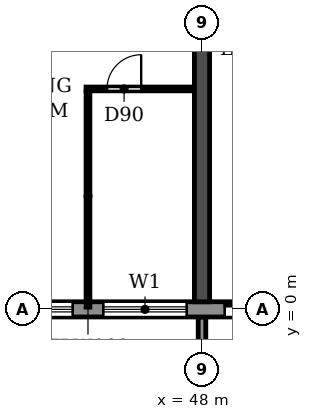
"""IFC4 building model, lengths in metres.
Left out: names, types, materials, properties, quantities, classifications, styles, units other than length and angle.
Written with IfcOpenShell. Run it as: python <this file> out.ifc"""

import sys

from ifc_helpers import new_model, si_unit, direction, frame, frame_2d, origin, place, context, subcontext, project, spatial, polyline, rectangle, outline, extrude, source, transform, mapped, element, fill, save


model = new_model("IFC4")
c1 = context("Model", 3, precision=1e-05, world=origin(), true_north=direction((0.0, 1.0)))
c2 = subcontext(c1, "Body", "Model", "MODEL_VIEW")
j1 = project(units=[si_unit("LENGTHUNIT", "METRE"), si_unit("PLANEANGLEUNIT", "RADIAN")], contexts=[c1])
p1 = place(None, origin())
s1 = spatial("IfcSite", under=j1, at=p1, CompositionType="ELEMENT")
p2 = place(p1, origin())
s2 = spatial("IfcBuilding", under=s1, at=p2, CompositionType="ELEMENT")
p3 = place(p2, frame((0.0, 0.0, 26.7)))
s3 = spatial("IfcBuildingStorey", under=s2, at=p3, CompositionType="ELEMENT", Elevation=26.7)
p4 = place(p3, frame((48.0, 0.2, 0.0), z_axis=(0.0, 0.0, 1.0), x_axis=(0.0, 1.0, 0.0)))
e1 = element("IfcWall", 1, at=p4, inside=s3, PredefinedType="SHEAR", context=c2, shape_type="SweptSolid", body=[
    extrude(rectangle(XDim=11.65, YDim=0.4, at=frame_2d((5.825, 0.0))), origin(), (0.0, 0.0, 1.0), 3.05),
])
p5 = place(p3, frame((4.683, 0.0, 0.0), z_axis=(0.0, 0.0, 1.0), x_axis=(1.0, 0.0, 0.0)))
e2 = element("IfcWall", 2, at=p5, inside=s3, PredefinedType="STANDARD", context=c2, shape_type="SweptSolid", body=[
    extrude(rectangle(XDim=92.634, YDim=0.4, at=frame_2d((46.317, 0.0))), origin(), (0.0, 0.0, 1.0), 3.05),
])
p6 = place(p5, frame((1.717, 0.0, 0.9)))
e3 = element("IfcOpeningElement", 3, at=p6, cuts=e2, PredefinedType="OPENING", context=c2, shape_type="SweptSolid", body=[
    extrude(rectangle(XDim=2.2, YDim=1.5, at=frame_2d((1.1, 0.75))), frame((0.0, 0.21, 0.0), z_axis=(0.0, -1.0, 0.0), x_axis=(1.0, 0.0, 0.0)), (0.0, 0.0, 1.0), 0.42),
])
p7 = place(p5, frame((4.717, 0.0, 0.9)))
e4 = element("IfcOpeningElement", 4, at=p7, cuts=e2, PredefinedType="OPENING", context=c2, shape_type="SweptSolid", body=[
    extrude(rectangle(XDim=2.2, YDim=1.5, at=frame_2d((1.1, 0.75))), frame((0.0, 0.21, 0.0), z_axis=(0.0, -1.0, 0.0), x_axis=(1.0, 0.0, 0.0)), (0.0, 0.0, 1.0), 0.42),
])
p8 = place(p5, frame((7.717, 0.0, 0.9)))
e5 = element("IfcOpeningElement", 5, at=p8, cuts=e2, PredefinedType="OPENING", context=c2, shape_type="SweptSolid", body=[
    extrude(rectangle(XDim=2.2, YDim=1.5, at=frame_2d((1.1, 0.75))), frame((0.0, 0.21, 0.0), z_axis=(0.0, -1.0, 0.0), x_axis=(1.0, 0.0, 0.0)), (0.0, 0.0, 1.0), 0.42),
])
p9 = place(p5, frame((10.717, 0.0, 0.9)))
e6 = element("IfcOpeningElement", 6, at=p9, cuts=e2, PredefinedType="OPENING", context=c2, shape_type="SweptSolid", body=[
    extrude(rectangle(XDim=2.2, YDim=1.5, at=frame_2d((1.1, 0.75))), frame((0.0, 0.21, 0.0), z_axis=(0.0, -1.0, 0.0), x_axis=(1.0, 0.0, 0.0)), (0.0, 0.0, 1.0), 0.42),
])
p10 = place(p5, frame((13.717, 0.0, 0.9)))
e7 = element("IfcOpeningElement", 7, at=p10, cuts=e2, PredefinedType="OPENING", context=c2, shape_type="SweptSolid", body=[
    extrude(rectangle(XDim=2.2, YDim=1.5, at=frame_2d((1.1, 0.75))), frame((0.0, 0.21, 0.0), z_axis=(0.0, -1.0, 0.0), x_axis=(1.0, 0.0, 0.0)), (0.0, 0.0, 1.0), 0.42),
])
p11 = place(p5, frame((16.717, 0.0, 0.9)))
e8 = element("IfcOpeningElement", 8, at=p11, cuts=e2, PredefinedType="OPENING", context=c2, shape_type="SweptSolid", body=[
    extrude(rectangle(XDim=2.2, YDim=1.5, at=frame_2d((1.1, 0.75))), frame((0.0, 0.21, 0.0), z_axis=(0.0, -1.0, 0.0), x_axis=(1.0, 0.0, 0.0)), (0.0, 0.0, 1.0), 0.42),
])
p12 = place(p5, frame((19.917, 0.0, 0.0)))
e9 = element("IfcOpeningElement", 9, at=p12, cuts=e2, PredefinedType="OPENING", context=c2, shape_type="SweptSolid", body=[
    extrude(rectangle(XDim=1.8, YDim=2.4, at=frame_2d((0.9, 1.2))), frame((0.0, 0.21, 0.0), z_axis=(0.0, -1.0, 0.0), x_axis=(1.0, 0.0, 0.0)), (0.0, 0.0, 1.0), 0.42),
])
p13 = place(p5, frame((22.717, 0.0, 0.9)))
e10 = element("IfcOpeningElement", 10, at=p13, cuts=e2, PredefinedType="OPENING", context=c2, shape_type="SweptSolid", body=[
    extrude(rectangle(XDim=2.2, YDim=1.5, at=frame_2d((1.1, 0.75))), frame((0.0, 0.21, 0.0), z_axis=(0.0, -1.0, 0.0), x_axis=(1.0, 0.0, 0.0)), (0.0, 0.0, 1.0), 0.42),
])
p14 = place(p5, frame((25.717, 0.0, 0.9)))
e11 = element("IfcOpeningElement", 11, at=p14, cuts=e2, PredefinedType="OPENING", context=c2, shape_type="SweptSolid", body=[
    extrude(rectangle(XDim=2.2, YDim=1.5, at=frame_2d((1.1, 0.75))), frame((0.0, 0.21, 0.0), z_axis=(0.0, -1.0, 0.0), x_axis=(1.0, 0.0, 0.0)), (0.0, 0.0, 1.0), 0.42),
])
p15 = place(p5, frame((28.717, 0.0, 0.9)))
e12 = element("IfcOpeningElement", 12, at=p15, cuts=e2, PredefinedType="OPENING", context=c2, shape_type="SweptSolid", body=[
    extrude(rectangle(XDim=2.2, YDim=1.5, at=frame_2d((1.1, 0.75))), frame((0.0, 0.21, 0.0), z_axis=(0.0, -1.0, 0.0), x_axis=(1.0, 0.0, 0.0)), (0.0, 0.0, 1.0), 0.42),
])
p16 = place(p5, frame((31.917, 0.0, 0.0)))
e13 = element("IfcOpeningElement", 13, at=p16, cuts=e2, PredefinedType="OPENING", context=c2, shape_type="SweptSolid", body=[
    extrude(rectangle(XDim=1.8, YDim=2.4, at=frame_2d((0.9, 1.2))), frame((0.0, 0.21, 0.0), z_axis=(0.0, -1.0, 0.0), x_axis=(1.0, 0.0, 0.0)), (0.0, 0.0, 1.0), 0.42),
])
p17 = place(p5, frame((34.717, 0.0, 0.9)))
e14 = element("IfcOpeningElement", 14, at=p17, cuts=e2, PredefinedType="OPENING", context=c2, shape_type="SweptSolid", body=[
    extrude(rectangle(XDim=2.2, YDim=1.5, at=frame_2d((1.1, 0.75))), frame((0.0, 0.21, 0.0), z_axis=(0.0, -1.0, 0.0), x_axis=(1.0, 0.0, 0.0)), (0.0, 0.0, 1.0), 0.42),
])
p18 = place(p5, frame((37.717, 0.0, 0.9)))
e15 = element("IfcOpeningElement", 15, at=p18, cuts=e2, PredefinedType="OPENING", context=c2, shape_type="SweptSolid", body=[
    extrude(rectangle(XDim=2.2, YDim=1.5, at=frame_2d((1.1, 0.75))), frame((0.0, 0.21, 0.0), z_axis=(0.0, -1.0, 0.0), x_axis=(1.0, 0.0, 0.0)), (0.0, 0.0, 1.0), 0.42),
])
p19 = place(p5, frame((40.717, 0.0, 0.9)))
e16 = element("IfcOpeningElement", 16, at=p19, cuts=e2, PredefinedType="OPENING", context=c2, shape_type="SweptSolid", body=[
    extrude(rectangle(XDim=2.2, YDim=1.5, at=frame_2d((1.1, 0.75))), frame((0.0, 0.21, 0.0), z_axis=(0.0, -1.0, 0.0), x_axis=(1.0, 0.0, 0.0)), (0.0, 0.0, 1.0), 0.42),
])
p20 = place(p5, frame((43.917, 0.0, 0.0)))
e17 = element("IfcOpeningElement", 17, at=p20, cuts=e2, PredefinedType="OPENING", context=c2, shape_type="SweptSolid", body=[
    extrude(rectangle(XDim=1.8, YDim=2.4, at=frame_2d((0.9, 1.2))), frame((0.0, 0.21, 0.0), z_axis=(0.0, -1.0, 0.0), x_axis=(1.0, 0.0, 0.0)), (0.0, 0.0, 1.0), 0.42),
])
p21 = place(p5, frame((46.717, 0.0, 0.9)))
e18 = element("IfcOpeningElement", 18, at=p21, cuts=e2, PredefinedType="OPENING", context=c2, shape_type="SweptSolid", body=[
    extrude(rectangle(XDim=2.2, YDim=1.5, at=frame_2d((1.1, 0.75))), frame((0.0, 0.21, 0.0), z_axis=(0.0, -1.0, 0.0), x_axis=(1.0, 0.0, 0.0)), (0.0, 0.0, 1.0), 0.42),
])
p22 = place(p5, frame((49.717, 0.0, 0.9)))
e19 = element("IfcOpeningElement", 19, at=p22, cuts=e2, PredefinedType="OPENING", context=c2, shape_type="SweptSolid", body=[
    extrude(rectangle(XDim=2.2, YDim=1.5, at=frame_2d((1.1, 0.75))), frame((0.0, 0.21, 0.0), z_axis=(0.0, -1.0, 0.0), x_axis=(1.0, 0.0, 0.0)), (0.0, 0.0, 1.0), 0.42),
])
p23 = place(p5, frame((52.717, 0.0, 0.9)))
e20 = element("IfcOpeningElement", 20, at=p23, cuts=e2, PredefinedType="OPENING", context=c2, shape_type="SweptSolid", body=[
    extrude(rectangle(XDim=2.2, YDim=1.5, at=frame_2d((1.1, 0.75))), frame((0.0, 0.21, 0.0), z_axis=(0.0, -1.0, 0.0), x_axis=(1.0, 0.0, 0.0)), (0.0, 0.0, 1.0), 0.42),
])
p24 = place(p5, frame((55.717, 0.0, 0.9)))
e21 = element("IfcOpeningElement", 21, at=p24, cuts=e2, PredefinedType="OPENING", context=c2, shape_type="SweptSolid", body=[
    extrude(rectangle(XDim=2.2, YDim=1.5, at=frame_2d((1.1, 0.75))), frame((0.0, 0.21, 0.0), z_axis=(0.0, -1.0, 0.0), x_axis=(1.0, 0.0, 0.0)), (0.0, 0.0, 1.0), 0.42),
])
p25 = place(p5, frame((58.917, 0.0, 0.0)))
e22 = element("IfcOpeningElement", 22, at=p25, cuts=e2, PredefinedType="OPENING", context=c2, shape_type="SweptSolid", body=[
    extrude(rectangle(XDim=1.8, YDim=2.4, at=frame_2d((0.9, 1.2))), frame((0.0, 0.21, 0.0), z_axis=(0.0, -1.0, 0.0), x_axis=(1.0, 0.0, 0.0)), (0.0, 0.0, 1.0), 0.42),
])
p26 = place(p5, frame((61.717, 0.0, 0.9)))
e23 = element("IfcOpeningElement", 23, at=p26, cuts=e2, PredefinedType="OPENING", context=c2, shape_type="SweptSolid", body=[
    extrude(rectangle(XDim=2.2, YDim=1.5, at=frame_2d((1.1, 0.75))), frame((0.0, 0.21, 0.0), z_axis=(0.0, -1.0, 0.0), x_axis=(1.0, 0.0, 0.0)), (0.0, 0.0, 1.0), 0.42),
])
p27 = place(p5, frame((64.717, 0.0, 0.9)))
e24 = element("IfcOpeningElement", 24, at=p27, cuts=e2, PredefinedType="OPENING", context=c2, shape_type="SweptSolid", body=[
    extrude(rectangle(XDim=2.2, YDim=1.5, at=frame_2d((1.1, 0.75))), frame((0.0, 0.21, 0.0), z_axis=(0.0, -1.0, 0.0), x_axis=(1.0, 0.0, 0.0)), (0.0, 0.0, 1.0), 0.42),
])
p28 = place(p5, frame((67.717, 0.0, 0.9)))
e25 = element("IfcOpeningElement", 25, at=p28, cuts=e2, PredefinedType="OPENING", context=c2, shape_type="SweptSolid", body=[
    extrude(rectangle(XDim=2.2, YDim=1.5, at=frame_2d((1.1, 0.75))), frame((0.0, 0.21, 0.0), z_axis=(0.0, -1.0, 0.0), x_axis=(1.0, 0.0, 0.0)), (0.0, 0.0, 1.0), 0.42),
])
p29 = place(p5, frame((70.917, 0.0, 0.0)))
e26 = element("IfcOpeningElement", 26, at=p29, cuts=e2, PredefinedType="OPENING", context=c2, shape_type="SweptSolid", body=[
    extrude(rectangle(XDim=1.8, YDim=2.4, at=frame_2d((0.9, 1.2))), frame((0.0, 0.21, 0.0), z_axis=(0.0, -1.0, 0.0), x_axis=(1.0, 0.0, 0.0)), (0.0, 0.0, 1.0), 0.42),
])
p30 = place(p5, frame((73.717, 0.0, 0.9)))
e27 = element("IfcOpeningElement", 27, at=p30, cuts=e2, PredefinedType="OPENING", context=c2, shape_type="SweptSolid", body=[
    extrude(rectangle(XDim=2.2, YDim=1.5, at=frame_2d((1.1, 0.75))), frame((0.0, 0.21, 0.0), z_axis=(0.0, -1.0, 0.0), x_axis=(1.0, 0.0, 0.0)), (0.0, 0.0, 1.0), 0.42),
])
p31 = place(p5, frame((76.717, 0.0, 0.9)))
e28 = element("IfcOpeningElement", 28, at=p31, cuts=e2, PredefinedType="OPENING", context=c2, shape_type="SweptSolid", body=[
    extrude(rectangle(XDim=2.2, YDim=1.5, at=frame_2d((1.1, 0.75))), frame((0.0, 0.21, 0.0), z_axis=(0.0, -1.0, 0.0), x_axis=(1.0, 0.0, 0.0)), (0.0, 0.0, 1.0), 0.42),
])
p32 = place(p5, frame((79.717, 0.0, 0.9)))
e29 = element("IfcOpeningElement", 29, at=p32, cuts=e2, PredefinedType="OPENING", context=c2, shape_type="SweptSolid", body=[
    extrude(rectangle(XDim=2.2, YDim=1.5, at=frame_2d((1.1, 0.75))), frame((0.0, 0.21, 0.0), z_axis=(0.0, -1.0, 0.0), x_axis=(1.0, 0.0, 0.0)), (0.0, 0.0, 1.0), 0.42),
])
p33 = place(p5, frame((82.717, 0.0, 0.9)))
e30 = element("IfcOpeningElement", 30, at=p33, cuts=e2, PredefinedType="OPENING", context=c2, shape_type="SweptSolid", body=[
    extrude(rectangle(XDim=2.2, YDim=1.5, at=frame_2d((1.1, 0.75))), frame((0.0, 0.21, 0.0), z_axis=(0.0, -1.0, 0.0), x_axis=(1.0, 0.0, 0.0)), (0.0, 0.0, 1.0), 0.42),
])
p34 = place(p5, frame((85.717, 0.0, 0.9)))
e31 = element("IfcOpeningElement", 31, at=p34, cuts=e2, PredefinedType="OPENING", context=c2, shape_type="SweptSolid", body=[
    extrude(rectangle(XDim=2.2, YDim=1.5, at=frame_2d((1.1, 0.75))), frame((0.0, 0.21, 0.0), z_axis=(0.0, -1.0, 0.0), x_axis=(1.0, 0.0, 0.0)), (0.0, 0.0, 1.0), 0.42),
])
p35 = place(p5, frame((88.717, 0.0, 0.9)))
e32 = element("IfcOpeningElement", 32, at=p35, cuts=e2, PredefinedType="OPENING", context=c2, shape_type="SweptSolid", body=[
    extrude(rectangle(XDim=2.2, YDim=1.5, at=frame_2d((1.1, 0.75))), frame((0.0, 0.21, 0.0), z_axis=(0.0, -1.0, 0.0), x_axis=(1.0, 0.0, 0.0)), (0.0, 0.0, 1.0), 0.42),
])
m1 = source(origin(), c2, "Body", "SweptSolid", [
    extrude(outline(polyline([(0.0, 0.0), (0.2, 0.0), (0.2, 1.65), (0.0, 1.65), (0.0, 0.0)])), origin(), (0.0, 0.0, 1.0), 3.1),
])
p36 = place(p3, frame((47.9, -1.85, 0.0)))
e33 = element("IfcWall", 33, at=p36, inside=s3, PredefinedType="STANDARD", context=c2, shape_type="MappedRepresentation", body=[
    mapped(m1, transform((0.0, 0.0, 0.0))),
])
p37 = place(p3, frame((44.95, 5.8, 0.0), z_axis=(0.0, 0.0, 1.0), x_axis=(1.0, 0.0, 0.0)))
e34 = element("IfcWall", 34, at=p37, inside=s3, PredefinedType="PARTITIONING", context=c2, shape_type="SweptSolid", body=[
    extrude(rectangle(XDim=2.84, YDim=0.1, at=frame_2d((1.42, 0.0))), origin(), (0.0, 0.0, 1.0), 3.05),
])
p38 = place(p37, frame((0.55, 0.0, 0.0)))
e35 = element("IfcOpeningElement", 35, at=p38, cuts=e34, PredefinedType="OPENING", context=c2, shape_type="SweptSolid", body=[
    extrude(rectangle(XDim=0.9, YDim=2.1, at=frame_2d((0.45, 1.05))), frame((0.0, 0.06, 0.0), z_axis=(0.0, -1.0, 0.0), x_axis=(1.0, 0.0, 0.0)), (0.0, 0.0, 1.0), 0.12),
])
p39 = place(p3, frame((45.0, 0.06, 0.0), z_axis=(0.0, 0.0, 1.0), x_axis=(0.0, 1.0, 0.0)))
e36 = element("IfcWall", 36, at=p39, inside=s3, PredefinedType="PARTITIONING", context=c2, shape_type="SweptSolid", body=[
    extrude(rectangle(XDim=5.69, YDim=0.1, at=frame_2d((2.845, 0.0))), origin(), (0.0, 0.0, 1.0), 3.05),
])
p40 = place(p18, origin())
e37 = element("IfcWindow", 37, at=p40, inside=s3, PartitioningType="DOUBLE_PANEL_HORIZONTAL", PredefinedType="WINDOW", context=c2, shape_type="SweptSolid", body=[
    extrude(rectangle(XDim=2.2, YDim=1.5, at=frame_2d((1.1, 0.75))), frame((0.0, 0.03, 0.0), z_axis=(0.0, -1.0, 0.0), x_axis=(1.0, 0.0, 0.0)), (0.0, 0.0, 1.0), 0.06),
])
fill(e15, e37)
p41 = place(p19, origin())
e38 = element("IfcWindow", 38, at=p41, inside=s3, PartitioningType="DOUBLE_PANEL_HORIZONTAL", PredefinedType="WINDOW", context=c2, shape_type="SweptSolid", body=[
    extrude(rectangle(XDim=2.2, YDim=1.5, at=frame_2d((1.1, 0.75))), frame((0.0, 0.03, 0.0), z_axis=(0.0, -1.0, 0.0), x_axis=(1.0, 0.0, 0.0)), (0.0, 0.0, 1.0), 0.06),
])
fill(e16, e38)
p42 = place(p20, origin())
e39 = element("IfcDoor", 39, at=p42, inside=s3, OperationType="DOUBLE_DOOR_SLIDING", PredefinedType="DOOR", context=c2, shape_type="SweptSolid", body=[
    extrude(rectangle(XDim=1.8, YDim=2.4, at=frame_2d((0.9, 1.2))), frame((0.0, 0.025, 0.0), z_axis=(0.0, -1.0, 0.0), x_axis=(1.0, 0.0, 0.0)), (0.0, 0.0, 1.0), 0.05),
])
fill(e17, e39)
p43 = place(p38, origin())
e40 = element("IfcDoor", 40, at=p43, inside=s3, OperationType="SINGLE_SWING_RIGHT", PredefinedType="DOOR", context=c2, shape_type="SweptSolid", body=[
    extrude(rectangle(XDim=0.9, YDim=2.1, at=frame_2d((0.45, 1.05))), frame((0.0, 0.025, 0.0), z_axis=(0.0, -1.0, 0.0), x_axis=(1.0, 0.0, 0.0)), (0.0, 0.0, 1.0), 0.05),
])
fill(e35, e40)
save(model, sys.argv[1])
